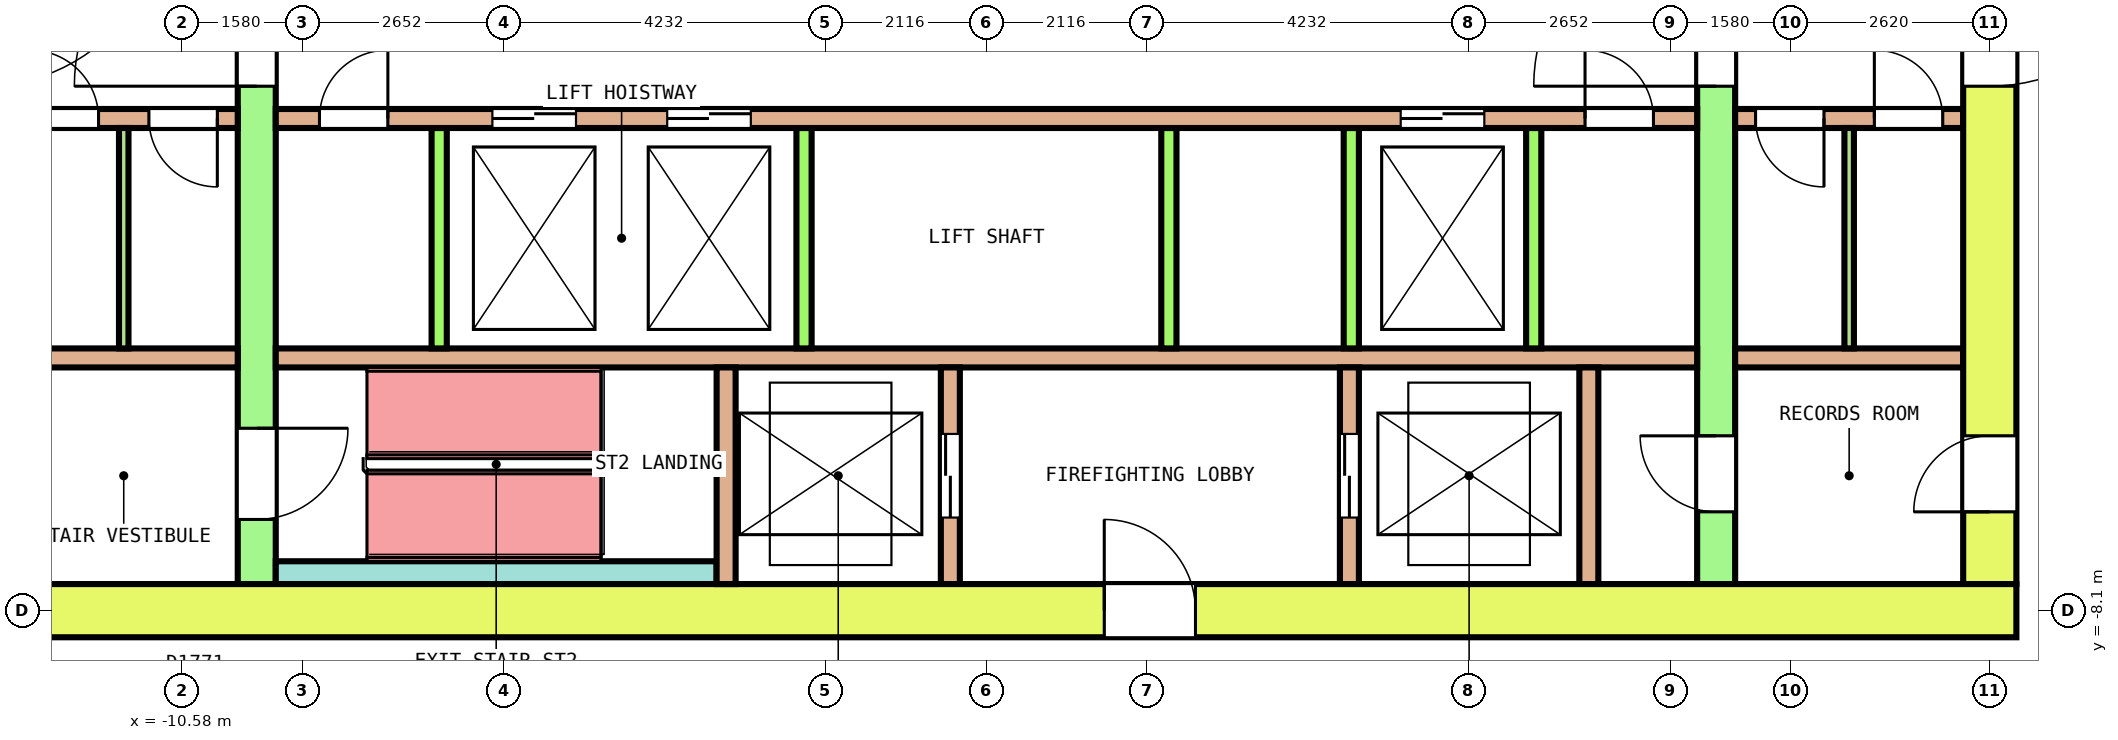
"""IFC4 building model, lengths in metres.
Left out: names, types, materials, properties, quantities, classifications, styles, units other than length and angle.
Written with IfcOpenShell. Run it as: python <this file> out.ifc"""

import sys

from ifc_helpers import new_model, si_unit, direction, frame, frame_2d, origin, place, context, subcontext, project, spatial, rectangle, extrude, element, fill, save


model = new_model("IFC4")
c1 = context("Model", 3, precision=1e-05, world=origin(), true_north=direction((0.0, 1.0)))
c2 = subcontext(c1, "Body", "Model", "MODEL_VIEW")
j1 = project(units=[si_unit("LENGTHUNIT", "METRE"), si_unit("PLANEANGLEUNIT", "RADIAN")], contexts=[c1])
p1 = place(None, origin())
s1 = spatial("IfcSite", under=j1, at=p1, CompositionType="ELEMENT")
p2 = place(p1, origin())
s2 = spatial("IfcBuilding", under=s1, at=p2, CompositionType="ELEMENT")
p3 = place(p2, frame((0.0, 0.0, 162.8)))
s3 = spatial("IfcBuildingStorey", under=s2, at=p3, CompositionType="ELEMENT", Elevation=162.8)
p4 = place(p3, frame((-13.55, -8.1, 0.0), z_axis=(0.0, 0.0, 1.0), x_axis=(1.0, 0.0, 0.0)))
e1 = element("IfcWall", 1, at=p4, inside=s3, PredefinedType="SHEAR", context=c2, shape_type="SweptSolid", body=[
    extrude(rectangle(XDim=27.1, YDim=0.7, at=frame_2d((13.55, 0.0))), origin(), (0.0, 0.0, 1.0), 4.1),
])
p5 = place(p4, frame((15.1, 0.0, 0.0)))
e2 = element("IfcOpeningElement", 2, at=p5, cuts=e1, PredefinedType="OPENING", context=c2, shape_type="SweptSolid", body=[
    extrude(rectangle(XDim=1.2, YDim=2.1, at=frame_2d((0.6, 1.05))), frame((0.0, 0.36, 0.0), z_axis=(0.0, -1.0, 0.0), x_axis=(1.0, 0.0, 0.0)), (0.0, 0.0, 1.0), 0.72),
])
p6 = place(p3, frame((13.2, -7.75, 0.0), z_axis=(0.0, 0.0, 1.0), x_axis=(0.0, 1.0, 0.0)))
e3 = element("IfcWall", 3, at=p6, inside=s3, PredefinedType="SHEAR", context=c2, shape_type="SweptSolid", body=[
    extrude(rectangle(XDim=15.5, YDim=0.7, at=frame_2d((7.75, 0.0))), origin(), (0.0, 0.0, 1.0), 4.1),
])
p7 = place(p6, frame((6.55, 0.0, 0.0)))
e4 = element("IfcOpeningElement", 4, at=p7, cuts=e3, PredefinedType="OPENING", context=c2, shape_type="SweptSolid", body=[
    extrude(rectangle(XDim=2.4, YDim=2.1, at=frame_2d((1.2, 1.05))), frame((0.0, 0.36, 0.0), z_axis=(0.0, -1.0, 0.0), x_axis=(1.0, 0.0, 0.0)), (0.0, 0.0, 1.0), 0.72),
])
p8 = place(p6, frame((13.45, 0.0, 0.0)))
e5 = element("IfcOpeningElement", 5, at=p8, cuts=e3, PredefinedType="OPENING", context=c2, shape_type="SweptSolid", body=[
    extrude(rectangle(XDim=1.2, YDim=2.1, at=frame_2d((0.6, 1.05))), frame((0.0, 0.36, 0.0), z_axis=(0.0, -1.0, 0.0), x_axis=(1.0, 0.0, 0.0)), (0.0, 0.0, 1.0), 0.72),
])
p9 = place(p6, frame((0.95, 0.0, 0.0)))
e6 = element("IfcOpeningElement", 6, at=p9, cuts=e3, PredefinedType="OPENING", context=c2, shape_type="SweptSolid", body=[
    extrude(rectangle(XDim=1.0, YDim=2.1, at=frame_2d((0.5, 1.05))), frame((0.0, 0.36, 0.0), z_axis=(0.0, -1.0, 0.0), x_axis=(1.0, 0.0, 0.0)), (0.0, 0.0, 1.0), 0.72),
])
p10 = place(p3, frame((-9.6, -7.75, 0.0), z_axis=(0.0, 0.0, 1.0), x_axis=(0.0, 1.0, 0.0)))
e7 = element("IfcWall", 7, at=p10, inside=s3, PredefinedType="SHEAR", context=c2, shape_type="SweptSolid", body=[
    extrude(rectangle(XDim=15.5, YDim=0.5, at=frame_2d((7.75, 0.0))), origin(), (0.0, 0.0, 1.0), 4.1),
])
p11 = place(p10, frame((6.55, 0.0, 0.0)))
e8 = element("IfcOpeningElement", 8, at=p11, cuts=e7, PredefinedType="OPENING", context=c2, shape_type="SweptSolid", body=[
    extrude(rectangle(XDim=2.4, YDim=2.1, at=frame_2d((1.2, 1.05))), frame((0.0, 0.26, 0.0), z_axis=(0.0, -1.0, 0.0), x_axis=(1.0, 0.0, 0.0)), (0.0, 0.0, 1.0), 0.52),
])
p12 = place(p10, frame((13.45, 0.0, 0.0)))
e9 = element("IfcOpeningElement", 9, at=p12, cuts=e7, PredefinedType="OPENING", context=c2, shape_type="SweptSolid", body=[
    extrude(rectangle(XDim=1.2, YDim=2.1, at=frame_2d((0.6, 1.05))), frame((0.0, 0.26, 0.0), z_axis=(0.0, -1.0, 0.0), x_axis=(1.0, 0.0, 0.0)), (0.0, 0.0, 1.0), 0.52),
])
p13 = place(p10, frame((0.85, 0.0, 0.0)))
e10 = element("IfcOpeningElement", 10, at=p13, cuts=e7, PredefinedType="OPENING", context=c2, shape_type="SweptSolid", body=[
    extrude(rectangle(XDim=1.2, YDim=2.1, at=frame_2d((0.6, 1.05))), frame((0.0, 0.26, 0.0), z_axis=(0.0, -1.0, 0.0), x_axis=(1.0, 0.0, 0.0)), (0.0, 0.0, 1.0), 0.52),
])
p14 = place(p3, frame((9.6, -7.75, 0.0), z_axis=(0.0, 0.0, 1.0), x_axis=(0.0, 1.0, 0.0)))
e11 = element("IfcWall", 11, at=p14, inside=s3, PredefinedType="SHEAR", context=c2, shape_type="SweptSolid", body=[
    extrude(rectangle(XDim=15.5, YDim=0.5, at=frame_2d((7.75, 0.0))), origin(), (0.0, 0.0, 1.0), 4.1),
])
p15 = place(p14, frame((6.55, 0.0, 0.0)))
e12 = element("IfcOpeningElement", 12, at=p15, cuts=e11, PredefinedType="OPENING", context=c2, shape_type="SweptSolid", body=[
    extrude(rectangle(XDim=2.4, YDim=2.1, at=frame_2d((1.2, 1.05))), frame((0.0, 0.26, 0.0), z_axis=(0.0, -1.0, 0.0), x_axis=(1.0, 0.0, 0.0)), (0.0, 0.0, 1.0), 0.52),
])
p16 = place(p14, frame((13.45, 0.0, 0.0)))
e13 = element("IfcOpeningElement", 13, at=p16, cuts=e11, PredefinedType="OPENING", context=c2, shape_type="SweptSolid", body=[
    extrude(rectangle(XDim=1.2, YDim=2.1, at=frame_2d((0.6, 1.05))), frame((0.0, 0.26, 0.0), z_axis=(0.0, -1.0, 0.0), x_axis=(1.0, 0.0, 0.0)), (0.0, 0.0, 1.0), 0.52),
])
p17 = place(p14, frame((0.95, 0.0, 0.0)))
e14 = element("IfcOpeningElement", 14, at=p17, cuts=e11, PredefinedType="OPENING", context=c2, shape_type="SweptSolid", body=[
    extrude(rectangle(XDim=1.0, YDim=2.1, at=frame_2d((0.5, 1.05))), frame((0.0, 0.26, 0.0), z_axis=(0.0, -1.0, 0.0), x_axis=(1.0, 0.0, 0.0)), (0.0, 0.0, 1.0), 0.52),
])
p18 = place(p3, frame((-12.85, -1.625, 0.0), z_axis=(0.0, 0.0, 1.0), x_axis=(1.0, 0.0, 0.0)))
e15 = element("IfcWall", 15, at=p18, inside=s3, PredefinedType="SOLIDWALL", context=c2, shape_type="SweptSolid", body=[
    extrude(rectangle(XDim=3.0, YDim=0.25, at=frame_2d((1.5, 0.0))), origin(), (0.0, 0.0, 1.0), 4.1),
])
p19 = place(p18, frame((0.269, 0.0, 0.0)))
e16 = element("IfcOpeningElement", 16, at=p19, cuts=e15, PredefinedType="OPENING", context=c2, shape_type="SweptSolid", body=[
    extrude(rectangle(XDim=0.9, YDim=2.1, at=frame_2d((0.45, 1.05))), frame((0.0, 0.135, 0.0), z_axis=(0.0, -1.0, 0.0), x_axis=(1.0, 0.0, 0.0)), (0.0, 0.0, 1.0), 0.27),
])
p20 = place(p18, frame((1.831, 0.0, 0.0)))
e17 = element("IfcOpeningElement", 17, at=p20, cuts=e15, PredefinedType="OPENING", context=c2, shape_type="SweptSolid", body=[
    extrude(rectangle(XDim=0.9, YDim=2.1, at=frame_2d((0.45, 1.05))), frame((0.0, 0.135, 0.0), z_axis=(0.0, -1.0, 0.0), x_axis=(1.0, 0.0, 0.0)), (0.0, 0.0, 1.0), 0.27),
])
p21 = place(p3, frame((-9.35, -1.625, 0.0), z_axis=(0.0, 0.0, 1.0), x_axis=(1.0, 0.0, 0.0)))
e18 = element("IfcWall", 18, at=p21, inside=s3, PredefinedType="SOLIDWALL", context=c2, shape_type="SweptSolid", body=[
    extrude(rectangle(XDim=18.7, YDim=0.25, at=frame_2d((9.35, 0.0))), origin(), (0.0, 0.0, 1.0), 4.1),
])
p22 = place(p21, frame((2.85, 0.0, 0.0)))
e19 = element("IfcOpeningElement", 19, at=p22, cuts=e18, PredefinedType="OPENING", context=c2, shape_type="SweptSolid", body=[
    extrude(rectangle(XDim=1.1, YDim=2.1, at=frame_2d((0.55, 1.05))), frame((0.0, 0.135, 0.0), z_axis=(0.0, -1.0, 0.0), x_axis=(1.0, 0.0, 0.0)), (0.0, 0.0, 1.0), 0.27),
])
p23 = place(p21, frame((5.15, 0.0, 0.0)))
e20 = element("IfcOpeningElement", 20, at=p23, cuts=e18, PredefinedType="OPENING", context=c2, shape_type="SweptSolid", body=[
    extrude(rectangle(XDim=1.1, YDim=2.1, at=frame_2d((0.55, 1.05))), frame((0.0, 0.135, 0.0), z_axis=(0.0, -1.0, 0.0), x_axis=(1.0, 0.0, 0.0)), (0.0, 0.0, 1.0), 0.27),
])
p24 = place(p21, frame((14.8, 0.0, 0.0)))
e21 = element("IfcOpeningElement", 21, at=p24, cuts=e18, PredefinedType="OPENING", context=c2, shape_type="SweptSolid", body=[
    extrude(rectangle(XDim=1.1, YDim=2.1, at=frame_2d((0.55, 1.05))), frame((0.0, 0.135, 0.0), z_axis=(0.0, -1.0, 0.0), x_axis=(1.0, 0.0, 0.0)), (0.0, 0.0, 1.0), 0.27),
])
p25 = place(p21, frame((0.575, 0.0, 0.0)))
e22 = element("IfcOpeningElement", 22, at=p25, cuts=e18, PredefinedType="OPENING", context=c2, shape_type="SweptSolid", body=[
    extrude(rectangle(XDim=0.9, YDim=2.1, at=frame_2d((0.45, 1.05))), frame((0.0, 0.135, 0.0), z_axis=(0.0, -1.0, 0.0), x_axis=(1.0, 0.0, 0.0)), (0.0, 0.0, 1.0), 0.27),
])
p26 = place(p21, frame((17.225, 0.0, 0.0)))
e23 = element("IfcOpeningElement", 23, at=p26, cuts=e18, PredefinedType="OPENING", context=c2, shape_type="SweptSolid", body=[
    extrude(rectangle(XDim=0.9, YDim=2.1, at=frame_2d((0.45, 1.05))), frame((0.0, 0.135, 0.0), z_axis=(0.0, -1.0, 0.0), x_axis=(1.0, 0.0, 0.0)), (0.0, 0.0, 1.0), 0.27),
])
p27 = place(p3, frame((9.85, -1.625, 0.0), z_axis=(0.0, 0.0, 1.0), x_axis=(1.0, 0.0, 0.0)))
e24 = element("IfcWall", 24, at=p27, inside=s3, PredefinedType="SOLIDWALL", context=c2, shape_type="SweptSolid", body=[
    extrude(rectangle(XDim=3.0, YDim=0.25, at=frame_2d((1.5, 0.0))), origin(), (0.0, 0.0, 1.0), 4.1),
])
p28 = place(p27, frame((0.269, 0.0, 0.0)))
e25 = element("IfcOpeningElement", 25, at=p28, cuts=e24, PredefinedType="OPENING", context=c2, shape_type="SweptSolid", body=[
    extrude(rectangle(XDim=0.9, YDim=2.1, at=frame_2d((0.45, 1.05))), frame((0.0, 0.135, 0.0), z_axis=(0.0, -1.0, 0.0), x_axis=(1.0, 0.0, 0.0)), (0.0, 0.0, 1.0), 0.27),
])
p29 = place(p27, frame((1.831, 0.0, 0.0)))
e26 = element("IfcOpeningElement", 26, at=p29, cuts=e24, PredefinedType="OPENING", context=c2, shape_type="SweptSolid", body=[
    extrude(rectangle(XDim=0.9, YDim=2.1, at=frame_2d((0.45, 1.05))), frame((0.0, 0.135, 0.0), z_axis=(0.0, -1.0, 0.0), x_axis=(1.0, 0.0, 0.0)), (0.0, 0.0, 1.0), 0.27),
])
p30 = place(p3, frame((-12.85, -4.775, 0.0), z_axis=(0.0, 0.0, 1.0), x_axis=(1.0, 0.0, 0.0)))
e27 = element("IfcWall", 27, at=p30, inside=s3, PredefinedType="SOLIDWALL", context=c2, shape_type="SweptSolid", body=[
    extrude(rectangle(XDim=3.0, YDim=0.25, at=frame_2d((1.5, 0.0))), origin(), (0.0, 0.0, 1.0), 4.1),
])
p31 = place(p3, frame((-9.35, -4.775, 0.0), z_axis=(0.0, 0.0, 1.0), x_axis=(1.0, 0.0, 0.0)))
e28 = element("IfcWall", 28, at=p31, inside=s3, PredefinedType="SOLIDWALL", context=c2, shape_type="SweptSolid", body=[
    extrude(rectangle(XDim=18.7, YDim=0.25, at=frame_2d((9.35, 0.0))), origin(), (0.0, 0.0, 1.0), 4.1),
])
p32 = place(p3, frame((9.85, -4.775, 0.0), z_axis=(0.0, 0.0, 1.0), x_axis=(1.0, 0.0, 0.0)))
e29 = element("IfcWall", 29, at=p32, inside=s3, PredefinedType="SOLIDWALL", context=c2, shape_type="SweptSolid", body=[
    extrude(rectangle(XDim=3.0, YDim=0.25, at=frame_2d((1.5, 0.0))), origin(), (0.0, 0.0, 1.0), 4.1),
])
for number, where, z_axis, x_axis in (
    (30, (-7.2, -4.65, 0.0), (0.0, 0.0, 1.0), (0.0, 1.0, 0.0)),
    (31, (-2.4, -4.65, 0.0), (0.0, 0.0, 1.0), (0.0, 1.0, 0.0)),
    (32, (2.4, -4.65, 0.0), (0.0, 0.0, 1.0), (0.0, 1.0, 0.0)),
    (33, (4.8, -4.65, 0.0), (0.0, 0.0, 1.0), (0.0, 1.0, 0.0)),
    (34, (7.2, -4.65, 0.0), (0.0, 0.0, 1.0), (0.0, 1.0, 0.0)),
):
    element("IfcWall", number, at=place(p3, frame(where, z_axis=z_axis, x_axis=x_axis)), inside=s3, PredefinedType="SOLIDWALL", context=c2, shape_type="SweptSolid", body=[
        extrude(rectangle(XDim=2.9, YDim=0.2, at=frame_2d((1.45, 0.0))), origin(), (0.0, 0.0, 1.0), 4.1),
    ])
p33 = place(p3, frame((-9.35, -7.6, 0.0), z_axis=(0.0, 0.0, 1.0), x_axis=(1.0, 0.0, 0.0)))
e35 = element("IfcWall", 35, at=p33, inside=s3, PredefinedType="SOLIDWALL", context=c2, shape_type="SweptSolid", body=[
    extrude(rectangle(XDim=5.8, YDim=0.3, at=frame_2d((2.9, 0.0))), origin(), (0.0, 0.0, 1.0), 4.1),
])
p34 = place(p3, frame((-3.425, -7.75, 0.0), z_axis=(0.0, 0.0, 1.0), x_axis=(0.0, 1.0, 0.0)))
e36 = element("IfcWall", 36, at=p34, inside=s3, PredefinedType="SOLIDWALL", context=c2, shape_type="SweptSolid", body=[
    extrude(rectangle(XDim=2.85, YDim=0.25, at=frame_2d((1.425, 0.0))), origin(), (0.0, 0.0, 1.0), 4.1),
])
p35 = place(p3, frame((-0.475, -7.75, 0.0), z_axis=(0.0, 0.0, 1.0), x_axis=(0.0, 1.0, 0.0)))
e37 = element("IfcWall", 37, at=p35, inside=s3, PredefinedType="SOLIDWALL", context=c2, shape_type="SweptSolid", body=[
    extrude(rectangle(XDim=2.85, YDim=0.25, at=frame_2d((1.425, 0.0))), origin(), (0.0, 0.0, 1.0), 4.1),
])
p36 = place(p35, frame((0.875, 0.0, 0.0)))
e38 = element("IfcOpeningElement", 38, at=p36, cuts=e37, PredefinedType="OPENING", context=c2, shape_type="SweptSolid", body=[
    extrude(rectangle(XDim=1.1, YDim=2.1, at=frame_2d((0.55, 1.05))), frame((0.0, 0.135, 0.0), z_axis=(0.0, -1.0, 0.0), x_axis=(1.0, 0.0, 0.0)), (0.0, 0.0, 1.0), 0.27),
])
p37 = place(p3, frame((4.775, -7.75, 0.0), z_axis=(0.0, 0.0, 1.0), x_axis=(0.0, 1.0, 0.0)))
e39 = element("IfcWall", 39, at=p37, inside=s3, PredefinedType="SOLIDWALL", context=c2, shape_type="SweptSolid", body=[
    extrude(rectangle(XDim=2.85, YDim=0.25, at=frame_2d((1.425, 0.0))), origin(), (0.0, 0.0, 1.0), 4.1),
])
p38 = place(p37, frame((0.875, 0.0, 0.0)))
e40 = element("IfcOpeningElement", 40, at=p38, cuts=e39, PredefinedType="OPENING", context=c2, shape_type="SweptSolid", body=[
    extrude(rectangle(XDim=1.1, YDim=2.1, at=frame_2d((0.55, 1.05))), frame((0.0, 0.135, 0.0), z_axis=(0.0, -1.0, 0.0), x_axis=(1.0, 0.0, 0.0)), (0.0, 0.0, 1.0), 0.27),
])
p39 = place(p3, frame((7.925, -7.75, 0.0), z_axis=(0.0, 0.0, 1.0), x_axis=(0.0, 1.0, 0.0)))
e41 = element("IfcWall", 41, at=p39, inside=s3, PredefinedType="SOLIDWALL", context=c2, shape_type="SweptSolid", body=[
    extrude(rectangle(XDim=2.85, YDim=0.25, at=frame_2d((1.425, 0.0))), origin(), (0.0, 0.0, 1.0), 4.1),
])
for number, where, z_axis, x_axis in (
    (42, (-11.35, -4.65, 0.0), (0.0, 0.0, 1.0), (0.0, 1.0, 0.0)),
    (43, (11.35, -4.65, 0.0), (0.0, 0.0, 1.0), (0.0, 1.0, 0.0)),
):
    element("IfcWall", number, at=place(p3, frame(where, z_axis=z_axis, x_axis=x_axis)), inside=s3, PredefinedType="PARTITIONING", context=c2, shape_type="SweptSolid", body=[
        extrude(rectangle(XDim=2.9, YDim=0.125, at=frame_2d((1.45, 0.0))), origin(), (0.0, 0.0, 1.0), 4.1),
    ])
p40 = place(p22, origin())
e44 = element("IfcDoor", 44, at=p40, inside=s3, OperationType="DOUBLE_DOOR_SLIDING", PredefinedType="DOOR", context=c2, shape_type="SweptSolid", body=[
    extrude(rectangle(XDim=1.1, YDim=2.1, at=frame_2d((0.55, 1.05))), frame((0.0, 0.075, 0.0), z_axis=(0.0, -1.0, 0.0), x_axis=(1.0, 0.0, 0.0)), (0.0, 0.0, 1.0), 0.15),
])
fill(e19, e44)
p41 = place(p23, origin())
e45 = element("IfcDoor", 45, at=p41, inside=s3, OperationType="DOUBLE_DOOR_SLIDING", PredefinedType="DOOR", context=c2, shape_type="SweptSolid", body=[
    extrude(rectangle(XDim=1.1, YDim=2.1, at=frame_2d((0.55, 1.05))), frame((0.0, 0.075, 0.0), z_axis=(0.0, -1.0, 0.0), x_axis=(1.0, 0.0, 0.0)), (0.0, 0.0, 1.0), 0.15),
])
fill(e20, e45)
p42 = place(p24, origin())
e46 = element("IfcDoor", 46, at=p42, inside=s3, OperationType="DOUBLE_DOOR_SLIDING", PredefinedType="DOOR", context=c2, shape_type="SweptSolid", body=[
    extrude(rectangle(XDim=1.1, YDim=2.1, at=frame_2d((0.55, 1.05))), frame((0.0, 0.075, 0.0), z_axis=(0.0, -1.0, 0.0), x_axis=(1.0, 0.0, 0.0)), (0.0, 0.0, 1.0), 0.15),
])
fill(e21, e46)
p43 = place(p36, origin())
e47 = element("IfcDoor", 47, at=p43, inside=s3, OperationType="DOUBLE_DOOR_SLIDING", PredefinedType="DOOR", context=c2, shape_type="SweptSolid", body=[
    extrude(rectangle(XDim=1.1, YDim=2.1, at=frame_2d((0.55, 1.05))), frame((0.0, 0.075, 0.0), z_axis=(0.0, -1.0, 0.0), x_axis=(1.0, 0.0, 0.0)), (0.0, 0.0, 1.0), 0.15),
])
fill(e38, e47)
p44 = place(p38, origin())
e48 = element("IfcDoor", 48, at=p44, inside=s3, OperationType="DOUBLE_DOOR_SLIDING", PredefinedType="DOOR", context=c2, shape_type="SweptSolid", body=[
    extrude(rectangle(XDim=1.1, YDim=2.1, at=frame_2d((0.55, 1.05))), frame((0.0, 0.075, 0.0), z_axis=(0.0, -1.0, 0.0), x_axis=(1.0, 0.0, 0.0)), (0.0, 0.0, 1.0), 0.15),
])
fill(e40, e48)
p45 = place(p11, origin())
e49 = element("IfcDoor", 49, at=p45, inside=s3, OperationType="DOUBLE_DOOR_SINGLE_SWING", PredefinedType="DOOR", context=c2, shape_type="SweptSolid", body=[
    extrude(rectangle(XDim=2.4, YDim=2.1, at=frame_2d((1.2, 1.05))), frame((0.0, 0.2, 0.0), z_axis=(0.0, -1.0, 0.0), x_axis=(1.0, 0.0, 0.0)), (0.0, 0.0, 1.0), 0.4),
])
fill(e8, e49)
p46 = place(p15, origin())
e50 = element("IfcDoor", 50, at=p46, inside=s3, OperationType="DOUBLE_DOOR_SINGLE_SWING", PredefinedType="DOOR", context=c2, shape_type="SweptSolid", body=[
    extrude(rectangle(XDim=2.4, YDim=2.1, at=frame_2d((1.2, 1.05))), frame((0.0, 0.2, 0.0), z_axis=(0.0, -1.0, 0.0), x_axis=(1.0, 0.0, 0.0)), (0.0, 0.0, 1.0), 0.4),
])
fill(e12, e50)
p47 = place(p7, origin())
e51 = element("IfcDoor", 51, at=p47, inside=s3, OperationType="DOUBLE_DOOR_SINGLE_SWING", PredefinedType="DOOR", context=c2, shape_type="SweptSolid", body=[
    extrude(rectangle(XDim=2.4, YDim=2.1, at=frame_2d((1.2, 1.05))), frame((0.0, 0.3, 0.0), z_axis=(0.0, -1.0, 0.0), x_axis=(1.0, 0.0, 0.0)), (0.0, 0.0, 1.0), 0.6),
])
fill(e4, e51)
p48 = place(p13, origin())
e52 = element("IfcDoor", 52, at=p48, inside=s3, OperationType="SINGLE_SWING_LEFT", PredefinedType="DOOR", context=c2, shape_type="SweptSolid", body=[
    extrude(rectangle(XDim=1.2, YDim=2.1, at=frame_2d((0.6, 1.05))), frame((0.0, 0.2, 0.0), z_axis=(0.0, -1.0, 0.0), x_axis=(1.0, 0.0, 0.0)), (0.0, 0.0, 1.0), 0.4),
])
fill(e10, e52)
p49 = place(p5, origin())
e53 = element("IfcDoor", 53, at=p49, inside=s3, OperationType="SINGLE_SWING_LEFT", PredefinedType="DOOR", context=c2, shape_type="SweptSolid", body=[
    extrude(rectangle(XDim=1.2, YDim=2.1, at=frame_2d((0.6, 1.05))), frame((0.0, 0.3, 0.0), z_axis=(0.0, -1.0, 0.0), x_axis=(1.0, 0.0, 0.0)), (0.0, 0.0, 1.0), 0.6),
])
fill(e2, e53)
p50 = place(p17, origin())
e54 = element("IfcDoor", 54, at=p50, inside=s3, OperationType="SINGLE_SWING_LEFT", PredefinedType="DOOR", context=c2, shape_type="SweptSolid", body=[
    extrude(rectangle(XDim=1.0, YDim=2.1, at=frame_2d((0.5, 1.05))), frame((0.0, 0.2, 0.0), z_axis=(0.0, -1.0, 0.0), x_axis=(1.0, 0.0, 0.0)), (0.0, 0.0, 1.0), 0.4),
])
fill(e14, e54)
p51 = place(p9, origin())
e55 = element("IfcDoor", 55, at=p51, inside=s3, OperationType="SINGLE_SWING_RIGHT", PredefinedType="DOOR", context=c2, shape_type="SweptSolid", body=[
    extrude(rectangle(XDim=1.0, YDim=2.1, at=frame_2d((0.5, 1.05))), frame((0.0, 0.3, 0.0), z_axis=(0.0, -1.0, 0.0), x_axis=(1.0, 0.0, 0.0)), (0.0, 0.0, 1.0), 0.6),
])
fill(e6, e55)
p52 = place(p19, origin())
e56 = element("IfcDoor", 56, at=p52, inside=s3, OperationType="SINGLE_SWING_LEFT", PredefinedType="DOOR", context=c2, shape_type="SweptSolid", body=[
    extrude(rectangle(XDim=0.9, YDim=2.1, at=frame_2d((0.45, 1.05))), frame((0.0, 0.075, 0.0), z_axis=(0.0, -1.0, 0.0), x_axis=(1.0, 0.0, 0.0)), (0.0, 0.0, 1.0), 0.15),
])
fill(e16, e56)
p53 = place(p20, origin())
e57 = element("IfcDoor", 57, at=p53, inside=s3, OperationType="SINGLE_SWING_RIGHT", PredefinedType="DOOR", context=c2, shape_type="SweptSolid", body=[
    extrude(rectangle(XDim=0.9, YDim=2.1, at=frame_2d((0.45, 1.05))), frame((0.0, 0.075, 0.0), z_axis=(0.0, -1.0, 0.0), x_axis=(1.0, 0.0, 0.0)), (0.0, 0.0, 1.0), 0.15),
])
fill(e17, e57)
p54 = place(p25, origin())
e58 = element("IfcDoor", 58, at=p54, inside=s3, OperationType="SINGLE_SWING_LEFT", PredefinedType="DOOR", context=c2, shape_type="SweptSolid", body=[
    extrude(rectangle(XDim=0.9, YDim=2.1, at=frame_2d((0.45, 1.05))), frame((0.0, 0.075, 0.0), z_axis=(0.0, -1.0, 0.0), x_axis=(1.0, 0.0, 0.0)), (0.0, 0.0, 1.0), 0.15),
])
fill(e22, e58)
p55 = place(p26, origin())
e59 = element("IfcDoor", 59, at=p55, inside=s3, OperationType="SINGLE_SWING_RIGHT", PredefinedType="DOOR", context=c2, shape_type="SweptSolid", body=[
    extrude(rectangle(XDim=0.9, YDim=2.1, at=frame_2d((0.45, 1.05))), frame((0.0, 0.075, 0.0), z_axis=(0.0, -1.0, 0.0), x_axis=(1.0, 0.0, 0.0)), (0.0, 0.0, 1.0), 0.15),
])
fill(e23, e59)
p56 = place(p28, origin())
e60 = element("IfcDoor", 60, at=p56, inside=s3, OperationType="SINGLE_SWING_LEFT", PredefinedType="DOOR", context=c2, shape_type="SweptSolid", body=[
    extrude(rectangle(XDim=0.9, YDim=2.1, at=frame_2d((0.45, 1.05))), frame((0.0, 0.075, 0.0), z_axis=(0.0, -1.0, 0.0), x_axis=(1.0, 0.0, 0.0)), (0.0, 0.0, 1.0), 0.15),
])
fill(e25, e60)
p57 = place(p29, origin())
e61 = element("IfcDoor", 61, at=p57, inside=s3, OperationType="SINGLE_SWING_RIGHT", PredefinedType="DOOR", context=c2, shape_type="SweptSolid", body=[
    extrude(rectangle(XDim=0.9, YDim=2.1, at=frame_2d((0.45, 1.05))), frame((0.0, 0.075, 0.0), z_axis=(0.0, -1.0, 0.0), x_axis=(1.0, 0.0, 0.0)), (0.0, 0.0, 1.0), 0.15),
])
fill(e26, e61)
save(model, sys.argv[1])
